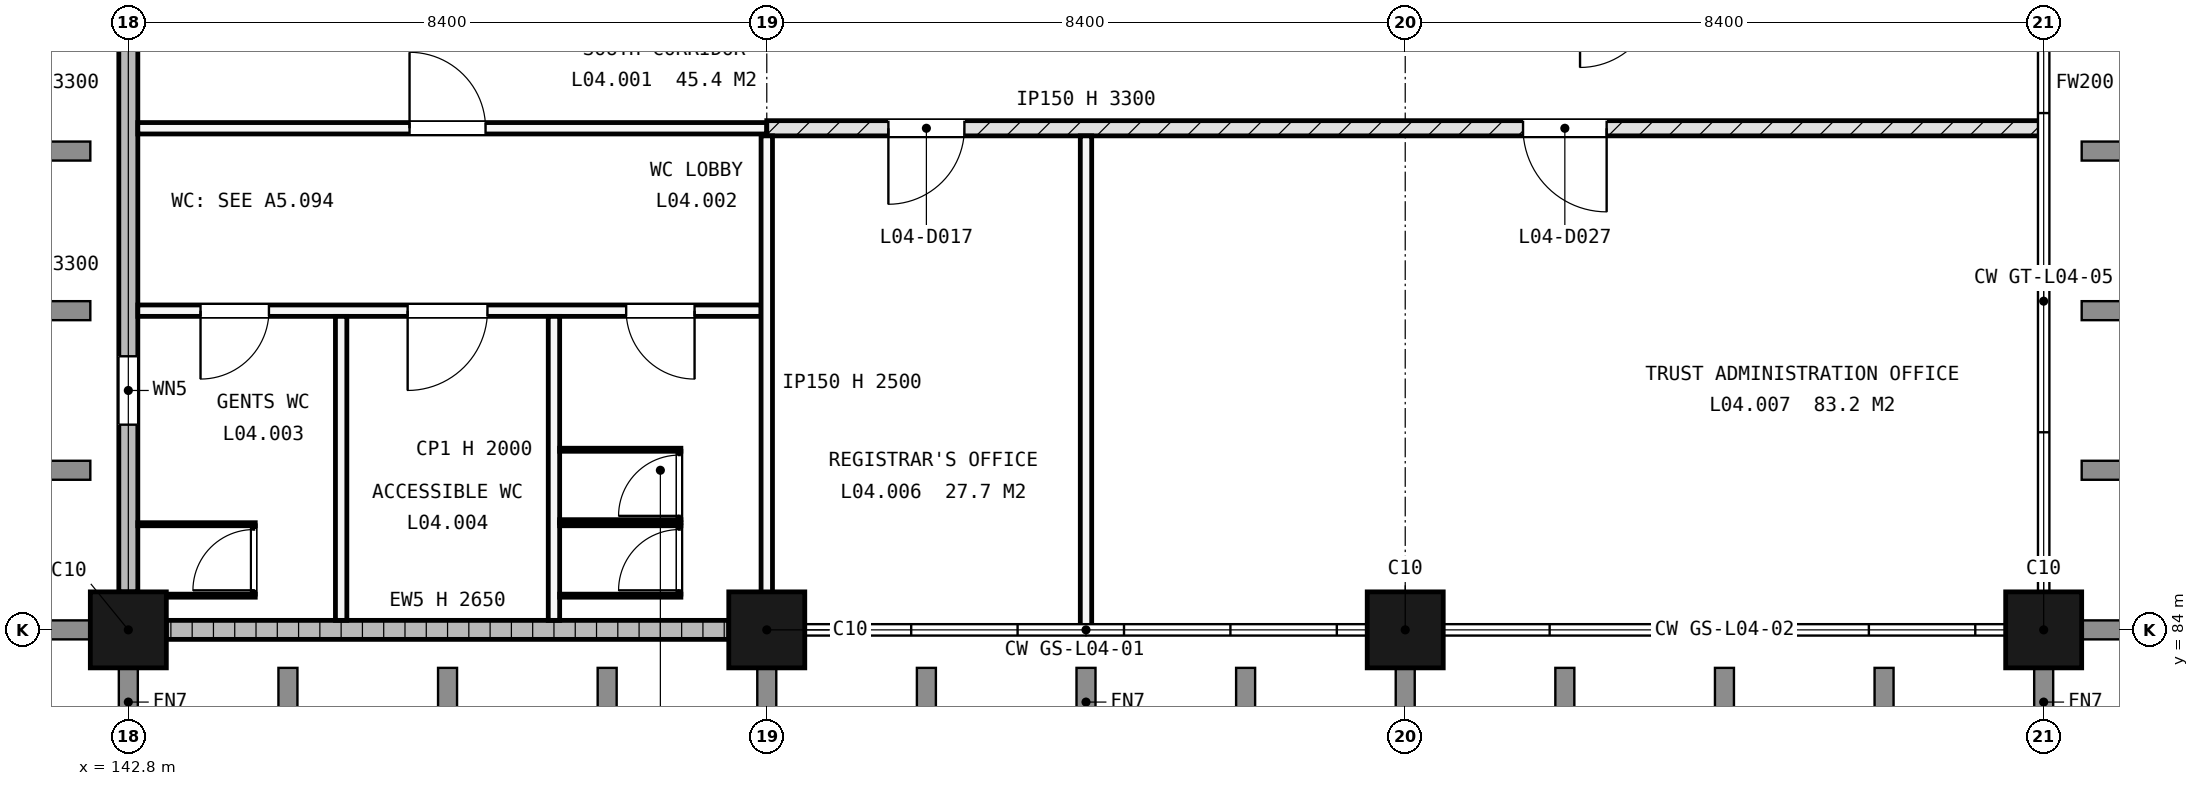
"""IFC4 building model, lengths in metres.
Left out: names, types, materials, properties, quantities, classifications, styles, units other than length and angle.
Written with IfcOpenShell. Run it as: python <this file> out.ifc"""

import sys

from ifc_helpers import new_model, si_unit, direction, frame, frame_2d, origin, origin_2d, place, context, subcontext, project, spatial, rectangle, extrude, element, fill, save


model = new_model("IFC4")
c1 = context("Model", 3, precision=1e-05, world=origin(), true_north=direction((0.0, 1.0)))
c2 = subcontext(c1, "Body", "Model", "MODEL_VIEW")
j1 = project(units=[si_unit("LENGTHUNIT", "METRE"), si_unit("PLANEANGLEUNIT", "RADIAN")], contexts=[c1])
p1 = place(None, origin())
s1 = spatial("IfcSite", under=j1, at=p1, CompositionType="ELEMENT")
p2 = place(p1, origin())
s2 = spatial("IfcBuilding", under=s1, at=p2, CompositionType="ELEMENT")
p3 = place(p2, frame((0.0, 0.0, 18.0)))
s3 = spatial("IfcBuildingStorey", under=s2, at=p3, CompositionType="ELEMENT", Elevation=18.0)
for number, where, z_axis, x_axis in (
    (1, (142.8, 84.0, -0.25), (0.0, 0.0, 1.0), (1.0, 0.0, 0.0)),
    (2, (151.2, 84.0, -0.25), (0.0, 0.0, 1.0), (1.0, 0.0, 0.0)),
    (3, (159.6, 84.0, -0.25), (0.0, 0.0, 1.0), (1.0, 0.0, 0.0)),
    (4, (168.0, 84.0, -0.25), (0.0, 0.0, 1.0), (1.0, 0.0, 0.0)),
):
    element("IfcColumn", number, at=place(p3, frame(where, z_axis=z_axis, x_axis=x_axis)), inside=s3, PredefinedType="COLUMN", context=c2, shape_type="SweptSolid", body=[
        extrude(rectangle(XDim=1.0, YDim=1.0, at=origin_2d()), origin(), (0.0, 0.0, 1.0), 3.6),
    ])
p4 = place(p3, frame((143.3, 84.0, 0.0), z_axis=(0.0, 0.0, 1.0), x_axis=(1.0, 0.0, 0.0)))
e5 = element("IfcWall", 5, at=p4, inside=s3, PredefinedType="STANDARD", context=c2, shape_type="SweptSolid", body=[
    extrude(rectangle(XDim=7.4, YDim=0.25, at=frame_2d((3.7, 0.0))), origin(), (0.0, 0.0, 1.0), 2.65),
])
p5 = place(p3, frame((142.8, 84.5, 0.0), z_axis=(0.0, 0.0, 1.0), x_axis=(0.0, 1.0, 0.0)))
e6 = element("IfcWall", 6, at=p5, inside=s3, PredefinedType="STANDARD", context=c2, shape_type="SweptSolid", body=[
    extrude(rectangle(XDim=7.675, YDim=0.25, at=frame_2d((3.837, 0.0))), origin(), (0.0, 0.0, 1.0), 3.3),
])
p6 = place(p5, frame((2.2, 0.0, 2.1)))
e7 = element("IfcOpeningElement", 7, at=p6, cuts=e6, PredefinedType="OPENING", context=c2, shape_type="SweptSolid", body=[
    extrude(rectangle(XDim=0.9, YDim=0.6, at=frame_2d((0.45, 0.3))), frame((0.0, 0.135, 0.0), z_axis=(0.0, -1.0, 0.0), x_axis=(1.0, 0.0, 0.0)), (0.0, 0.0, 1.0), 0.27),
])
p7 = place(p3, frame((142.925, 88.2, 0.0), z_axis=(0.0, 0.0, 1.0), x_axis=(1.0, 0.0, 0.0)))
e8 = element("IfcWall", 8, at=p7, inside=s3, PredefinedType="PARTITIONING", context=c2, shape_type="SweptSolid", body=[
    extrude(rectangle(XDim=8.2, YDim=0.15, at=frame_2d((4.1, 0.0))), origin(), (0.0, 0.0, 1.0), 3.3),
])
p8 = place(p7, frame((0.825, 0.0, 0.0)))
e9 = element("IfcOpeningElement", 9, at=p8, cuts=e8, PredefinedType="OPENING", context=c2, shape_type="SweptSolid", body=[
    extrude(rectangle(XDim=0.9, YDim=2.1, at=frame_2d((0.45, 1.05))), frame((0.0, 0.085, 0.0), z_axis=(0.0, -1.0, 0.0), x_axis=(1.0, 0.0, 0.0)), (0.0, 0.0, 1.0), 0.17),
])
p9 = place(p7, frame((3.55, 0.0, 0.0)))
e10 = element("IfcOpeningElement", 10, at=p9, cuts=e8, PredefinedType="OPENING", context=c2, shape_type="SweptSolid", body=[
    extrude(rectangle(XDim=1.05, YDim=2.25, at=frame_2d((0.525, 1.125))), frame((0.0, 0.085, 0.0), z_axis=(0.0, -1.0, 0.0), x_axis=(1.0, 0.0, 0.0)), (0.0, 0.0, 1.0), 0.17),
])
p10 = place(p7, frame((6.425, 0.0, 0.0)))
e11 = element("IfcOpeningElement", 11, at=p10, cuts=e8, PredefinedType="OPENING", context=c2, shape_type="SweptSolid", body=[
    extrude(rectangle(XDim=0.9, YDim=2.1, at=frame_2d((0.45, 1.05))), frame((0.0, 0.085, 0.0), z_axis=(0.0, -1.0, 0.0), x_axis=(1.0, 0.0, 0.0)), (0.0, 0.0, 1.0), 0.17),
])
p11 = place(p3, frame((142.925, 90.6, 0.0), z_axis=(0.0, 0.0, 1.0), x_axis=(1.0, 0.0, 0.0)))
e12 = element("IfcWall", 12, at=p11, inside=s3, PredefinedType="PARTITIONING", context=c2, shape_type="SweptSolid", body=[
    extrude(rectangle(XDim=8.275, YDim=0.15, at=frame_2d((4.137, 0.0))), origin(), (0.0, 0.0, 1.0), 3.3),
])
p12 = place(p11, frame((3.575, 0.0, 0.0)))
e13 = element("IfcOpeningElement", 13, at=p12, cuts=e12, PredefinedType="OPENING", context=c2, shape_type="SweptSolid", body=[
    extrude(rectangle(XDim=1.0, YDim=2.1, at=frame_2d((0.5, 1.05))), frame((0.0, 0.085, 0.0), z_axis=(0.0, -1.0, 0.0), x_axis=(1.0, 0.0, 0.0)), (0.0, 0.0, 1.0), 0.17),
])
p13 = place(p3, frame((151.2, 90.6, 0.0), z_axis=(0.0, 0.0, 1.0), x_axis=(1.0, 0.0, 0.0)))
e14 = element("IfcWall", 14, at=p13, inside=s3, PredefinedType="SOLIDWALL", context=c2, shape_type="SweptSolid", body=[
    extrude(rectangle(XDim=16.8, YDim=0.2, at=frame_2d((8.4, 0.0))), origin(), (0.0, 0.0, 1.0), 3.3),
])
p14 = place(p13, frame((1.6, 0.0, 0.0)))
e15 = element("IfcOpeningElement", 15, at=p14, cuts=e14, PredefinedType="OPENING", context=c2, shape_type="SweptSolid", body=[
    extrude(rectangle(XDim=1.0, YDim=2.1, at=frame_2d((0.5, 1.05))), frame((0.0, 0.11, 0.0), z_axis=(0.0, -1.0, 0.0), x_axis=(1.0, 0.0, 0.0)), (0.0, 0.0, 1.0), 0.22),
])
p15 = place(p13, frame((9.95, 0.0, 0.0)))
e16 = element("IfcOpeningElement", 16, at=p15, cuts=e14, PredefinedType="OPENING", context=c2, shape_type="SweptSolid", body=[
    extrude(rectangle(XDim=1.1, YDim=2.25, at=frame_2d((0.55, 1.125))), frame((0.0, 0.11, 0.0), z_axis=(0.0, -1.0, 0.0), x_axis=(1.0, 0.0, 0.0)), (0.0, 0.0, 1.0), 0.22),
])
for number, where, z_axis, x_axis in (
    (17, (145.6, 84.125, 0.0), (0.0, 0.0, 1.0), (0.0, 1.0, 0.0)),
    (18, (148.4, 84.125, 0.0), (0.0, 0.0, 1.0), (0.0, 1.0, 0.0)),
):
    element("IfcWall", number, at=place(p3, frame(where, z_axis=z_axis, x_axis=x_axis)), inside=s3, PredefinedType="PARTITIONING", context=c2, shape_type="SweptSolid", body=[
        extrude(rectangle(XDim=4.0, YDim=0.15, at=frame_2d((2.0, 0.0))), origin(), (0.0, 0.0, 1.0), 3.3),
    ])
p16 = place(p3, frame((151.2, 84.0, 0.0), z_axis=(0.0, 0.0, 1.0), x_axis=(0.0, 1.0, 0.0)))
e19 = element("IfcWall", 19, at=p16, inside=s3, PredefinedType="PARTITIONING", context=c2, shape_type="SweptSolid", body=[
    extrude(rectangle(XDim=6.5, YDim=0.15, at=frame_2d((3.25, 0.0))), origin(), (0.0, 0.0, 1.0), 2.5),
])
p17 = place(p3, frame((155.4, 84.0, 0.0), z_axis=(0.0, 0.0, 1.0), x_axis=(0.0, 1.0, 0.0)))
e20 = element("IfcWall", 20, at=p17, inside=s3, PredefinedType="PARTITIONING", context=c2, shape_type="SweptSolid", body=[
    extrude(rectangle(XDim=6.5, YDim=0.15, at=frame_2d((3.25, 0.0))), origin(), (0.0, 0.0, 1.0), 3.3),
])
p18 = place(p3, frame((142.93, 84.45, 0.0), z_axis=(0.0, 0.0, 1.0), x_axis=(1.0, 0.0, 0.0)))
e21 = element("IfcWall", 21, at=p18, inside=s3, PredefinedType="PARTITIONING", context=c2, shape_type="SweptSolid", body=[
    extrude(rectangle(XDim=1.54, YDim=0.04, at=frame_2d((0.77, 0.0))), origin(), (0.0, 0.0, 1.0), 2.0),
])
p19 = place(p3, frame((142.925, 85.39, 0.0), z_axis=(0.0, 0.0, 1.0), x_axis=(1.0, 0.0, 0.0)))
e22 = element("IfcWall", 22, at=p19, inside=s3, PredefinedType="PARTITIONING", context=c2, shape_type="SweptSolid", body=[
    extrude(rectangle(XDim=1.545, YDim=0.04, at=frame_2d((0.772, 0.0))), origin(), (0.0, 0.0, 1.0), 2.0),
])
p20 = place(p3, frame((144.45, 84.47, 0.0), z_axis=(0.0, 0.0, 1.0), x_axis=(0.0, 1.0, 0.0)))
e23 = element("IfcWall", 23, at=p20, inside=s3, PredefinedType="PARTITIONING", context=c2, shape_type="SweptSolid", body=[
    extrude(rectangle(XDim=0.9, YDim=0.04, at=frame_2d((0.45, 0.0))), origin(), (0.0, 0.0, 1.0), 2.0),
])
p21 = place(p20, frame((0.05, 0.0, 0.0)))
e24 = element("IfcOpeningElement", 24, at=p21, cuts=e23, PredefinedType="OPENING", context=c2, shape_type="SweptSolid", body=[
    extrude(rectangle(XDim=0.8, YDim=2.0, at=frame_2d((0.4, 1.0))), frame((0.0, 0.03, 0.0), z_axis=(0.0, -1.0, 0.0), x_axis=(1.0, 0.0, 0.0)), (0.0, 0.0, 1.0), 0.06),
])
for number, where, z_axis, x_axis in (
    (25, (148.475, 84.45, 0.0), (0.0, 0.0, 1.0), (1.0, 0.0, 0.0)),
    (26, (148.475, 85.39, 0.0), (0.0, 0.0, 1.0), (1.0, 0.0, 0.0)),
):
    element("IfcWall", number, at=place(p3, frame(where, z_axis=z_axis, x_axis=x_axis)), inside=s3, PredefinedType="PARTITIONING", context=c2, shape_type="SweptSolid", body=[
        extrude(rectangle(XDim=1.595, YDim=0.04, at=frame_2d((0.797, 0.0))), origin(), (0.0, 0.0, 1.0), 2.0),
    ])
p22 = place(p3, frame((150.05, 84.47, 0.0), z_axis=(0.0, 0.0, 1.0), x_axis=(0.0, 1.0, 0.0)))
e27 = element("IfcWall", 27, at=p22, inside=s3, PredefinedType="PARTITIONING", context=c2, shape_type="SweptSolid", body=[
    extrude(rectangle(XDim=0.9, YDim=0.04, at=frame_2d((0.45, 0.0))), origin(), (0.0, 0.0, 1.0), 2.0),
])
p23 = place(p22, frame((0.05, 0.0, 0.0)))
e28 = element("IfcOpeningElement", 28, at=p23, cuts=e27, PredefinedType="OPENING", context=c2, shape_type="SweptSolid", body=[
    extrude(rectangle(XDim=0.8, YDim=2.0, at=frame_2d((0.4, 1.0))), frame((0.0, 0.03, 0.0), z_axis=(0.0, -1.0, 0.0), x_axis=(1.0, 0.0, 0.0)), (0.0, 0.0, 1.0), 0.06),
])
for number, where, z_axis, x_axis in (
    (29, (148.475, 85.43, 0.0), (0.0, 0.0, 1.0), (1.0, 0.0, 0.0)),
    (30, (148.475, 86.37, 0.0), (0.0, 0.0, 1.0), (1.0, 0.0, 0.0)),
):
    element("IfcWall", number, at=place(p3, frame(where, z_axis=z_axis, x_axis=x_axis)), inside=s3, PredefinedType="PARTITIONING", context=c2, shape_type="SweptSolid", body=[
        extrude(rectangle(XDim=1.595, YDim=0.04, at=frame_2d((0.797, 0.0))), origin(), (0.0, 0.0, 1.0), 2.0),
    ])
p24 = place(p3, frame((150.05, 85.45, 0.0), z_axis=(0.0, 0.0, 1.0), x_axis=(0.0, 1.0, 0.0)))
e31 = element("IfcWall", 31, at=p24, inside=s3, PredefinedType="PARTITIONING", context=c2, shape_type="SweptSolid", body=[
    extrude(rectangle(XDim=0.9, YDim=0.04, at=frame_2d((0.45, 0.0))), origin(), (0.0, 0.0, 1.0), 2.0),
])
p25 = place(p24, frame((0.05, 0.0, 0.0)))
e32 = element("IfcOpeningElement", 32, at=p25, cuts=e31, PredefinedType="OPENING", context=c2, shape_type="SweptSolid", body=[
    extrude(rectangle(XDim=0.8, YDim=2.0, at=frame_2d((0.4, 1.0))), frame((0.0, 0.03, 0.0), z_axis=(0.0, -1.0, 0.0), x_axis=(1.0, 0.0, 0.0)), (0.0, 0.0, 1.0), 0.06),
])
p26 = place(p6, origin())
e33 = element("IfcWindow", 33, at=p26, inside=s3, PartitioningType="SINGLE_PANEL", PredefinedType="WINDOW", context=c2, shape_type="SweptSolid", body=[
    extrude(rectangle(XDim=0.9, YDim=0.6, at=frame_2d((0.45, 0.3))), frame((0.0, 0.03, 0.0), z_axis=(0.0, -1.0, 0.0), x_axis=(1.0, 0.0, 0.0)), (0.0, 0.0, 1.0), 0.06),
])
fill(e7, e33)
p27 = place(p8, origin())
e34 = element("IfcDoor", 34, at=p27, inside=s3, OperationType="SINGLE_SWING_LEFT", PredefinedType="DOOR", context=c2, shape_type="SweptSolid", body=[
    extrude(rectangle(XDim=0.9, YDim=2.1, at=frame_2d((0.45, 1.05))), frame((0.0, 0.025, 0.0), z_axis=(0.0, -1.0, 0.0), x_axis=(1.0, 0.0, 0.0)), (0.0, 0.0, 1.0), 0.05),
])
fill(e9, e34)
p28 = place(p9, origin())
e35 = element("IfcDoor", 35, at=p28, inside=s3, OperationType="SINGLE_SWING_LEFT", PredefinedType="DOOR", context=c2, shape_type="SweptSolid", body=[
    extrude(rectangle(XDim=1.05, YDim=2.25, at=frame_2d((0.525, 1.125))), frame((0.0, 0.025, 0.0), z_axis=(0.0, -1.0, 0.0), x_axis=(1.0, 0.0, 0.0)), (0.0, 0.0, 1.0), 0.05),
])
fill(e10, e35)
p29 = place(p10, origin())
e36 = element("IfcDoor", 36, at=p29, inside=s3, OperationType="SINGLE_SWING_RIGHT", PredefinedType="DOOR", context=c2, shape_type="SweptSolid", body=[
    extrude(rectangle(XDim=0.9, YDim=2.1, at=frame_2d((0.45, 1.05))), frame((0.0, 0.025, 0.0), z_axis=(0.0, -1.0, 0.0), x_axis=(1.0, 0.0, 0.0)), (0.0, 0.0, 1.0), 0.05),
])
fill(e11, e36)
p30 = place(p14, origin())
e37 = element("IfcDoor", 37, at=p30, inside=s3, OperationType="SINGLE_SWING_LEFT", PredefinedType="DOOR", context=c2, shape_type="SweptSolid", body=[
    extrude(rectangle(XDim=1.0, YDim=2.1, at=frame_2d((0.5, 1.05))), frame((0.0, 0.025, 0.0), z_axis=(0.0, -1.0, 0.0), x_axis=(1.0, 0.0, 0.0)), (0.0, 0.0, 1.0), 0.05),
])
fill(e15, e37)
p31 = place(p15, origin())
e38 = element("IfcDoor", 38, at=p31, inside=s3, OperationType="SINGLE_SWING_RIGHT", PredefinedType="DOOR", context=c2, shape_type="SweptSolid", body=[
    extrude(rectangle(XDim=1.1, YDim=2.25, at=frame_2d((0.55, 1.125))), frame((0.0, 0.025, 0.0), z_axis=(0.0, -1.0, 0.0), x_axis=(1.0, 0.0, 0.0)), (0.0, 0.0, 1.0), 0.05),
])
fill(e16, e38)
p32 = place(p12, origin())
e39 = element("IfcDoor", 39, at=p32, inside=s3, OperationType="SINGLE_SWING_RIGHT", PredefinedType="DOOR", context=c2, shape_type="SweptSolid", body=[
    extrude(rectangle(XDim=1.0, YDim=2.1, at=frame_2d((0.5, 1.05))), frame((0.0, 0.025, 0.0), z_axis=(0.0, -1.0, 0.0), x_axis=(1.0, 0.0, 0.0)), (0.0, 0.0, 1.0), 0.05),
])
fill(e13, e39)
p33 = place(p21, origin())
e40 = element("IfcDoor", 40, at=p33, inside=s3, OperationType="SINGLE_SWING_LEFT", PredefinedType="DOOR", context=c2, shape_type="SweptSolid", body=[
    extrude(rectangle(XDim=0.8, YDim=2.0, at=frame_2d((0.4, 1.0))), frame((0.0, 0.02, 0.0), z_axis=(0.0, -1.0, 0.0), x_axis=(1.0, 0.0, 0.0)), (0.0, 0.0, 1.0), 0.04),
])
fill(e24, e40)
p34 = place(p23, origin())
e41 = element("IfcDoor", 41, at=p34, inside=s3, OperationType="SINGLE_SWING_LEFT", PredefinedType="DOOR", context=c2, shape_type="SweptSolid", body=[
    extrude(rectangle(XDim=0.8, YDim=2.0, at=frame_2d((0.4, 1.0))), frame((0.0, 0.02, 0.0), z_axis=(0.0, -1.0, 0.0), x_axis=(1.0, 0.0, 0.0)), (0.0, 0.0, 1.0), 0.04),
])
fill(e28, e41)
p35 = place(p25, origin())
e42 = element("IfcDoor", 42, at=p35, inside=s3, OperationType="SINGLE_SWING_LEFT", PredefinedType="DOOR", context=c2, shape_type="SweptSolid", body=[
    extrude(rectangle(XDim=0.8, YDim=2.0, at=frame_2d((0.4, 1.0))), frame((0.0, 0.02, 0.0), z_axis=(0.0, -1.0, 0.0), x_axis=(1.0, 0.0, 0.0)), (0.0, 0.0, 1.0), 0.04),
])
fill(e32, e42)
save(model, sys.argv[1])
